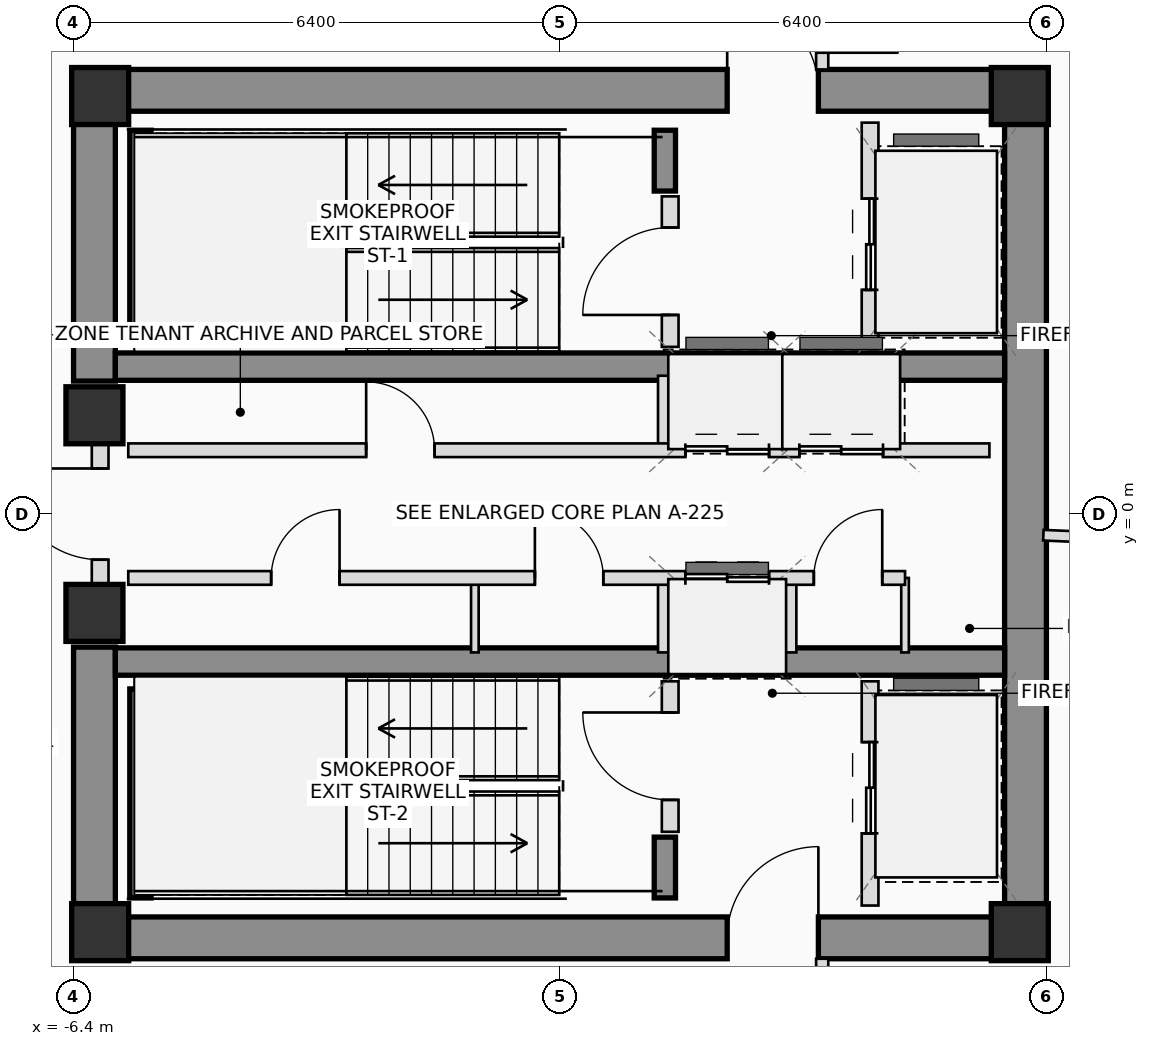
"""IFC4 building model, lengths in metres.
Left out: names, types, materials, properties, quantities, classifications, styles, units other than length and angle.
Written with IfcOpenShell. Run it as: python <this file> out.ifc"""

import sys

from ifc_helpers import new_model, si_unit, direction, frame, frame_2d, origin, origin_2d, place, context, subcontext, project, spatial, rectangle, extrude, source, transform, mapped, element, fill, save


model = new_model("IFC4")
c1 = context("Model", 3, precision=1e-05, world=origin(), true_north=direction((0.0, 1.0)))
c2 = subcontext(c1, "Body", "Model", "MODEL_VIEW")
j1 = project(units=[si_unit("LENGTHUNIT", "METRE"), si_unit("PLANEANGLEUNIT", "RADIAN")], contexts=[c1])
p1 = place(None, origin())
s1 = spatial("IfcSite", under=j1, at=p1, CompositionType="ELEMENT")
p2 = place(p1, origin())
s2 = spatial("IfcBuilding", under=s1, at=p2, CompositionType="ELEMENT")
p3 = place(p2, frame((0.0, 0.0, 267.75)))
s3 = spatial("IfcBuildingStorey", under=s2, at=p3, CompositionType="ELEMENT", Elevation=267.75)
m1 = source(origin(), c2, "Body", "SweptSolid", [
    extrude(rectangle(XDim=0.75, YDim=0.75, at=origin_2d()), origin(), (0.0, 0.0, 1.0), 3.4),
])
for number, where, z_axis, x_axis in (
    (1, (-6.05, -5.5, 0.0), (0.0, 0.0, 1.0), (1.0, 0.0, 0.0)),
    (2, (6.05, -5.5, 0.0), (0.0, 0.0, 1.0), (1.0, 0.0, 0.0)),
    (3, (6.05, 5.5, 0.0), (0.0, 0.0, 1.0), (1.0, 0.0, 0.0)),
    (4, (-6.05, 5.5, 0.0), (0.0, 0.0, 1.0), (1.0, 0.0, 0.0)),
):
    element("IfcColumn", number, at=place(p3, frame(where, z_axis=z_axis, x_axis=x_axis)), inside=s3, PredefinedType="COLUMN", context=c2, shape_type="MappedRepresentation", body=[
        mapped(m1, transform((0.0, 0.0, 0.0), scale=1.0)),
    ])
p4 = place(p3, frame((-6.4, 5.575, 0.0), z_axis=(0.0, 0.0, 1.0), x_axis=(1.0, 0.0, 0.0)))
e5 = element("IfcWall", 5, at=p4, inside=s3, PredefinedType="SHEAR", context=c2, shape_type="SweptSolid", body=[
    extrude(rectangle(XDim=12.8, YDim=0.55, at=frame_2d((6.4, 0.0))), origin(), (0.0, 0.0, 1.0), 3.4),
])
p5 = place(p4, frame((8.6, 0.0, 0.0)))
e6 = element("IfcOpeningElement", 6, at=p5, cuts=e5, PredefinedType="OPENING", context=c2, shape_type="SweptSolid", body=[
    extrude(rectangle(XDim=1.2, YDim=2.2, at=frame_2d((0.6, 1.1))), frame((0.0, 0.285, 0.0), z_axis=(0.0, -1.0, 0.0), x_axis=(1.0, 0.0, 0.0)), (0.0, 0.0, 1.0), 0.57),
])
p6 = place(p3, frame((-6.4, -5.575, 0.0), z_axis=(0.0, 0.0, 1.0), x_axis=(1.0, 0.0, 0.0)))
e7 = element("IfcWall", 7, at=p6, inside=s3, PredefinedType="SHEAR", context=c2, shape_type="SweptSolid", body=[
    extrude(rectangle(XDim=12.8, YDim=0.55, at=frame_2d((6.4, 0.0))), origin(), (0.0, 0.0, 1.0), 3.4),
])
p7 = place(p6, frame((8.6, 0.0, 0.0)))
e8 = element("IfcOpeningElement", 8, at=p7, cuts=e7, PredefinedType="OPENING", context=c2, shape_type="SweptSolid", body=[
    extrude(rectangle(XDim=1.2, YDim=2.2, at=frame_2d((0.6, 1.1))), frame((0.0, 0.285, 0.0), z_axis=(0.0, -1.0, 0.0), x_axis=(1.0, 0.0, 0.0)), (0.0, 0.0, 1.0), 0.57),
])
p8 = place(p3, frame((6.125, -5.3, 0.0), z_axis=(0.0, 0.0, 1.0), x_axis=(0.0, 1.0, 0.0)))
e9 = element("IfcWall", 9, at=p8, inside=s3, PredefinedType="SHEAR", context=c2, shape_type="SweptSolid", body=[
    extrude(rectangle(XDim=10.6, YDim=0.55, at=frame_2d((5.3, 0.0))), origin(), (0.0, 0.0, 1.0), 3.4),
])
for number, where, z_axis, x_axis in (
    (10, (-6.125, -5.3, 0.0), (0.0, 0.0, 1.0), (0.0, 1.0, 0.0)),
    (11, (-6.125, 1.75, 0.0), (0.0, 0.0, 1.0), (0.0, 1.0, 0.0)),
):
    element("IfcWall", number, at=place(p3, frame(where, z_axis=z_axis, x_axis=x_axis)), inside=s3, PredefinedType="SHEAR", context=c2, shape_type="SweptSolid", body=[
        extrude(rectangle(XDim=3.55, YDim=0.55, at=frame_2d((1.775, 0.0))), origin(), (0.0, 0.0, 1.0), 3.4),
    ])
for number, where, z_axis, x_axis in (
    (12, (-5.85, 1.94, 0.0), (0.0, 0.0, 1.0), (1.0, 0.0, 0.0)),
    (13, (-5.85, -1.94, 0.0), (0.0, 0.0, 1.0), (1.0, 0.0, 0.0)),
):
    element("IfcWall", number, at=place(p3, frame(where, z_axis=z_axis, x_axis=x_axis)), inside=s3, PredefinedType="SHEAR", context=c2, shape_type="SweptSolid", body=[
        extrude(rectangle(XDim=11.7, YDim=0.36, at=frame_2d((5.85, 0.0))), origin(), (0.0, 0.0, 1.0), 3.4),
    ])
p9 = place(p3, frame((-5.52, 2.3, 0.0), z_axis=(0.0, 0.0, 1.0), x_axis=(0.0, 1.0, 0.0)))
e14 = element("IfcWall", 14, at=p9, inside=s3, PredefinedType="SHEAR", context=c2, shape_type="SweptSolid", body=[
    extrude(rectangle(XDim=2.75, YDim=0.28, at=frame_2d((1.375, 0.0))), origin(), (0.0, 0.0, 1.0), 3.4),
])
p10 = place(p3, frame((1.38, 4.25, 0.0), z_axis=(0.0, 0.0, 1.0), x_axis=(0.0, 1.0, 0.0)))
e15 = element("IfcWall", 15, at=p10, inside=s3, PredefinedType="SHEAR", context=c2, shape_type="SweptSolid", body=[
    extrude(rectangle(XDim=0.8, YDim=0.28, at=frame_2d((0.4, 0.0))), origin(), (0.0, 0.0, 1.0), 3.4),
])
p11 = place(p3, frame((-5.52, -5.05, 0.0), z_axis=(0.0, 0.0, 1.0), x_axis=(0.0, 1.0, 0.0)))
e16 = element("IfcWall", 16, at=p11, inside=s3, PredefinedType="SHEAR", context=c2, shape_type="SweptSolid", body=[
    extrude(rectangle(XDim=2.75, YDim=0.28, at=frame_2d((1.375, 0.0))), origin(), (0.0, 0.0, 1.0), 3.4),
])
p12 = place(p3, frame((1.38, -5.05, 0.0), z_axis=(0.0, 0.0, 1.0), x_axis=(0.0, 1.0, 0.0)))
e17 = element("IfcWall", 17, at=p12, inside=s3, PredefinedType="SHEAR", context=c2, shape_type="SweptSolid", body=[
    extrude(rectangle(XDim=0.8, YDim=0.28, at=frame_2d((0.4, 0.0))), origin(), (0.0, 0.0, 1.0), 3.4),
])
for number, where, z_axis, x_axis in (
    (18, (-6.125, -1.3, 0.0), (0.0, 0.0, 1.0), (1.0, 0.0, 0.0)),
    (19, (-6.125, 1.3, 0.0), (0.0, 0.0, 1.0), (1.0, 0.0, 0.0)),
):
    element("IfcColumn", number, at=place(p3, frame(where, z_axis=z_axis, x_axis=x_axis)), inside=s3, PredefinedType="COLUMN", context=c2, shape_type="MappedRepresentation", body=[
        mapped(m1, transform((0.0, 0.0, 0.0), scale=1.0)),
    ])
p13 = place(p3, frame((-6.05, -0.95, 0.0), z_axis=(0.0, 0.0, 1.0), x_axis=(0.0, 1.0, 0.0)))
e20 = element("IfcWall", 20, at=p13, inside=s3, PredefinedType="PLUMBINGWALL", context=c2, shape_type="SweptSolid", body=[
    extrude(rectangle(XDim=1.9, YDim=0.22, at=frame_2d((0.95, 0.0))), origin(), (0.0, 0.0, 1.0), 2.18),
])
p14 = place(p13, frame((0.35, 0.0, 0.0)))
e21 = element("IfcOpeningElement", 21, at=p14, cuts=e20, PredefinedType="OPENING", context=c2, shape_type="SweptSolid", body=[
    extrude(rectangle(XDim=1.2, YDim=2.2, at=frame_2d((0.6, 1.1))), frame((0.0, 0.12, 0.0), z_axis=(0.0, -1.0, 0.0), x_axis=(1.0, 0.0, 0.0)), (0.0, 0.0, 1.0), 0.24),
])
p15 = place(p3, frame((1.45, 2.2, 0.0), z_axis=(0.0, 0.0, 1.0), x_axis=(0.0, 1.0, 0.0)))
e22 = element("IfcWall", 22, at=p15, inside=s3, PredefinedType="PLUMBINGWALL", context=c2, shape_type="SweptSolid", body=[
    extrude(rectangle(XDim=1.98, YDim=0.22, at=frame_2d((0.99, 0.0))), origin(), (0.0, 0.0, 1.0), 3.2),
])
p16 = place(p15, frame((0.42, 0.0, 0.0)))
e23 = element("IfcOpeningElement", 23, at=p16, cuts=e22, PredefinedType="OPENING", context=c2, shape_type="SweptSolid", body=[
    extrude(rectangle(XDim=1.15, YDim=2.15, at=frame_2d((0.575, 1.075))), frame((0.0, 0.12, 0.0), z_axis=(0.0, -1.0, 0.0), x_axis=(1.0, 0.0, 0.0)), (0.0, 0.0, 1.0), 0.24),
])
p17 = place(p3, frame((4.08, 2.2, 0.0), z_axis=(0.0, 0.0, 1.0), x_axis=(0.0, 1.0, 0.0)))
e24 = element("IfcWall", 24, at=p17, inside=s3, PredefinedType="PLUMBINGWALL", context=c2, shape_type="SweptSolid", body=[
    extrude(rectangle(XDim=2.95, YDim=0.22, at=frame_2d((1.475, 0.0))), origin(), (0.0, 0.0, 1.0), 3.2),
])
p18 = place(p17, frame((0.75, 0.0, 0.0)))
e25 = element("IfcOpeningElement", 25, at=p18, cuts=e24, PredefinedType="OPENING", context=c2, shape_type="SweptSolid", body=[
    extrude(rectangle(XDim=1.2, YDim=2.25, at=frame_2d((0.6, 1.125))), frame((0.0, 0.12, 0.0), z_axis=(0.0, -1.0, 0.0), x_axis=(1.0, 0.0, 0.0)), (0.0, 0.0, 1.0), 0.24),
])
p19 = place(p3, frame((1.45, -4.18, 0.0), z_axis=(0.0, 0.0, 1.0), x_axis=(0.0, 1.0, 0.0)))
e26 = element("IfcWall", 26, at=p19, inside=s3, PredefinedType="PLUMBINGWALL", context=c2, shape_type="SweptSolid", body=[
    extrude(rectangle(XDim=1.98, YDim=0.22, at=frame_2d((0.99, 0.0))), origin(), (0.0, 0.0, 1.0), 3.2),
])
p20 = place(p19, frame((0.42, 0.0, 0.0)))
e27 = element("IfcOpeningElement", 27, at=p20, cuts=e26, PredefinedType="OPENING", context=c2, shape_type="SweptSolid", body=[
    extrude(rectangle(XDim=1.15, YDim=2.15, at=frame_2d((0.575, 1.075))), frame((0.0, 0.12, 0.0), z_axis=(0.0, -1.0, 0.0), x_axis=(1.0, 0.0, 0.0)), (0.0, 0.0, 1.0), 0.24),
])
p21 = place(p3, frame((4.08, -5.15, 0.0), z_axis=(0.0, 0.0, 1.0), x_axis=(0.0, 1.0, 0.0)))
e28 = element("IfcWall", 28, at=p21, inside=s3, PredefinedType="PLUMBINGWALL", context=c2, shape_type="SweptSolid", body=[
    extrude(rectangle(XDim=2.95, YDim=0.22, at=frame_2d((1.475, 0.0))), origin(), (0.0, 0.0, 1.0), 3.2),
])
p22 = place(p21, frame((0.95, 0.0, 0.0)))
e29 = element("IfcOpeningElement", 29, at=p22, cuts=e28, PredefinedType="OPENING", context=c2, shape_type="SweptSolid", body=[
    extrude(rectangle(XDim=1.2, YDim=2.25, at=frame_2d((0.6, 1.125))), frame((0.0, 0.12, 0.0), z_axis=(0.0, -1.0, 0.0), x_axis=(1.0, 0.0, 0.0)), (0.0, 0.0, 1.0), 0.24),
])
p23 = place(p3, frame((-1.12, -1.82, 0.0), z_axis=(0.0, 0.0, 1.0), x_axis=(0.0, 1.0, 0.0)))
e30 = element("IfcWall", 30, at=p23, inside=s3, PredefinedType="PARTITIONING", context=c2, shape_type="SweptSolid", body=[
    extrude(rectangle(XDim=0.98, YDim=0.1, at=frame_2d((0.49, 0.0))), origin(), (0.0, 0.0, 1.0), 3.2),
])
for number, where, z_axis, x_axis in (
    (31, (1.38, 0.84, 0.0), (0.0, 0.0, 1.0), (0.0, 1.0, 0.0)),
    (32, (1.38, -1.82, 0.0), (0.0, 0.0, 1.0), (0.0, 1.0, 0.0)),
    (33, (3.02, 0.84, 0.0), (0.0, 0.0, 1.0), (0.0, 1.0, 0.0)),
    (34, (4.38, 0.84, 0.0), (0.0, 0.0, 1.0), (0.0, 1.0, 0.0)),
    (35, (3.02, -1.82, 0.0), (0.0, 0.0, 1.0), (0.0, 1.0, 0.0)),
):
    element("IfcWall", number, at=place(p3, frame(where, z_axis=z_axis, x_axis=x_axis)), inside=s3, PredefinedType="PLUMBINGWALL", context=c2, shape_type="SweptSolid", body=[
        extrude(rectangle(XDim=0.98, YDim=0.18, at=frame_2d((0.49, 0.0))), origin(), (0.0, 0.0, 1.0), 3.2),
    ])
p24 = place(p3, frame((4.54, -1.82, 0.0), z_axis=(0.0, 0.0, 1.0), x_axis=(0.0, 1.0, 0.0)))
e36 = element("IfcWall", 36, at=p24, inside=s3, PredefinedType="PARTITIONING", context=c2, shape_type="SweptSolid", body=[
    extrude(rectangle(XDim=0.98, YDim=0.1, at=frame_2d((0.49, 0.0))), origin(), (0.0, 0.0, 1.0), 3.2),
])
p25 = place(p3, frame((-5.68, 0.84, 0.0), z_axis=(0.0, 0.0, 1.0), x_axis=(1.0, 0.0, 0.0)))
e37 = element("IfcWall", 37, at=p25, inside=s3, PredefinedType="PLUMBINGWALL", context=c2, shape_type="SweptSolid", body=[
    extrude(rectangle(XDim=11.33, YDim=0.18, at=frame_2d((5.665, 0.0))), origin(), (0.0, 0.0, 1.0), 3.2),
])
p26 = place(p25, frame((3.13, 0.0, 0.0)))
e38 = element("IfcOpeningElement", 38, at=p26, cuts=e37, PredefinedType="OPENING", context=c2, shape_type="SweptSolid", body=[
    extrude(rectangle(XDim=0.9, YDim=2.05, at=frame_2d((0.45, 1.025))), frame((0.0, 0.1, 0.0), z_axis=(0.0, -1.0, 0.0), x_axis=(1.0, 0.0, 0.0)), (0.0, 0.0, 1.0), 0.2),
])
p27 = place(p25, frame((7.33, 0.0, 0.0)))
e39 = element("IfcOpeningElement", 39, at=p27, cuts=e37, PredefinedType="OPENING", context=c2, shape_type="SweptSolid", body=[
    extrude(rectangle(XDim=1.1, YDim=2.2, at=frame_2d((0.55, 1.1))), frame((0.0, 0.1, 0.0), z_axis=(0.0, -1.0, 0.0), x_axis=(1.0, 0.0, 0.0)), (0.0, 0.0, 1.0), 0.2),
])
p28 = place(p25, frame((8.83, 0.0, 0.0)))
e40 = element("IfcOpeningElement", 40, at=p28, cuts=e37, PredefinedType="OPENING", context=c2, shape_type="SweptSolid", body=[
    extrude(rectangle(XDim=1.1, YDim=2.2, at=frame_2d((0.55, 1.1))), frame((0.0, 0.1, 0.0), z_axis=(0.0, -1.0, 0.0), x_axis=(1.0, 0.0, 0.0)), (0.0, 0.0, 1.0), 0.2),
])
p29 = place(p3, frame((-5.68, -0.84, 0.0), z_axis=(0.0, 0.0, 1.0), x_axis=(1.0, 0.0, 0.0)))
e41 = element("IfcWall", 41, at=p29, inside=s3, PredefinedType="PLUMBINGWALL", context=c2, shape_type="SweptSolid", body=[
    extrude(rectangle(XDim=10.22, YDim=0.18, at=frame_2d((5.11, 0.0))), origin(), (0.0, 0.0, 1.0), 3.2),
])
p30 = place(p29, frame((1.88, 0.0, 0.0)))
e42 = element("IfcOpeningElement", 42, at=p30, cuts=e41, PredefinedType="OPENING", context=c2, shape_type="SweptSolid", body=[
    extrude(rectangle(XDim=0.9, YDim=2.05, at=frame_2d((0.45, 1.025))), frame((0.0, 0.1, 0.0), z_axis=(0.0, -1.0, 0.0), x_axis=(1.0, 0.0, 0.0)), (0.0, 0.0, 1.0), 0.2),
])
p31 = place(p29, frame((5.35, 0.0, 0.0)))
e43 = element("IfcOpeningElement", 43, at=p31, cuts=e41, PredefinedType="OPENING", context=c2, shape_type="SweptSolid", body=[
    extrude(rectangle(XDim=0.9, YDim=2.05, at=frame_2d((0.45, 1.025))), frame((0.0, 0.1, 0.0), z_axis=(0.0, -1.0, 0.0), x_axis=(1.0, 0.0, 0.0)), (0.0, 0.0, 1.0), 0.2),
])
p32 = place(p29, frame((7.33, 0.0, 0.0)))
e44 = element("IfcOpeningElement", 44, at=p32, cuts=e41, PredefinedType="OPENING", context=c2, shape_type="SweptSolid", body=[
    extrude(rectangle(XDim=1.1, YDim=2.2, at=frame_2d((0.55, 1.1))), frame((0.0, 0.1, 0.0), z_axis=(0.0, -1.0, 0.0), x_axis=(1.0, 0.0, 0.0)), (0.0, 0.0, 1.0), 0.2),
])
p33 = place(p29, frame((9.02, 0.0, 0.0)))
e45 = element("IfcOpeningElement", 45, at=p33, cuts=e41, PredefinedType="OPENING", context=c2, shape_type="SweptSolid", body=[
    extrude(rectangle(XDim=0.9, YDim=2.05, at=frame_2d((0.45, 1.025))), frame((0.0, 0.1, 0.0), z_axis=(0.0, -1.0, 0.0), x_axis=(1.0, 0.0, 0.0)), (0.0, 0.0, 1.0), 0.2),
])
p34 = place(p3, frame((3.45, 7.49, 0.0), z_axis=(0.0, 0.0, 1.0), x_axis=(0.0, -1.0, 0.0)))
e46 = element("IfcWall", 46, at=p34, inside=s3, PredefinedType="PARTITIONING", context=c2, shape_type="SweptSolid", body=[
    extrude(rectangle(XDim=1.64, YDim=0.16, at=frame_2d((0.82, 0.0))), origin(), (0.0, 0.0, 1.0), 2.805),
])
p35 = place(p34, frame((0.42, 0.0, 0.0)))
e47 = element("IfcOpeningElement", 47, at=p35, cuts=e46, PredefinedType="OPENING", context=c2, shape_type="SweptSolid", body=[
    extrude(rectangle(XDim=1.0, YDim=2.25, at=frame_2d((0.5, 1.125))), frame((0.0, 0.09, 0.0), z_axis=(0.0, -1.0, 0.0), x_axis=(1.0, 0.0, 0.0)), (0.0, 0.0, 1.0), 0.18),
])
p36 = place(p3, frame((3.45, -5.85, 0.0), z_axis=(0.0, 0.0, 1.0), x_axis=(0.0, -1.0, 0.0)))
e48 = element("IfcWall", 48, at=p36, inside=s3, PredefinedType="PARTITIONING", context=c2, shape_type="SweptSolid", body=[
    extrude(rectangle(XDim=1.64, YDim=0.16, at=frame_2d((0.82, 0.0))), origin(), (0.0, 0.0, 1.0), 3.2),
])
p37 = place(p36, frame((0.32, 0.0, 0.0)))
e49 = element("IfcOpeningElement", 49, at=p37, cuts=e48, PredefinedType="OPENING", context=c2, shape_type="SweptSolid", body=[
    extrude(rectangle(XDim=1.0, YDim=2.25, at=frame_2d((0.5, 1.125))), frame((0.0, 0.09, 0.0), z_axis=(0.0, -1.0, 0.0), x_axis=(1.0, 0.0, 0.0)), (0.0, 0.0, 1.0), 0.18),
])
p38 = place(p3, frame((6.36, -0.278, 0.0), z_axis=(0.0, 0.0, 1.0), x_axis=(0.999047788643, -0.043629302162, 0.0)))
e50 = element("IfcWall", 50, at=p38, inside=s3, PredefinedType="PARTITIONING", context=c2, shape_type="SweptSolid", body=[
    extrude(rectangle(XDim=11.197, YDim=0.14, at=frame_2d((5.599, 0.0))), origin(), (0.0, 0.0, 1.0), 2.765),
])
p39 = place(p5, origin())
e51 = element("IfcDoor", 51, at=p39, inside=s3, OperationType="SINGLE_SWING_LEFT", PredefinedType="DOOR", context=c2, shape_type="SweptSolid", body=[
    extrude(rectangle(XDim=1.2, YDim=2.2, at=frame_2d((0.6, 1.1))), frame((0.0, 0.025, 0.0), z_axis=(0.0, -1.0, 0.0), x_axis=(1.0, 0.0, 0.0)), (0.0, 0.0, 1.0), 0.05),
])
fill(e6, e51)
p40 = place(p7, origin())
e52 = element("IfcDoor", 52, at=p40, inside=s3, OperationType="SINGLE_SWING_RIGHT", PredefinedType="DOOR", context=c2, shape_type="SweptSolid", body=[
    extrude(rectangle(XDim=1.2, YDim=2.2, at=frame_2d((0.6, 1.1))), frame((0.0, 0.025, 0.0), z_axis=(0.0, -1.0, 0.0), x_axis=(1.0, 0.0, 0.0)), (0.0, 0.0, 1.0), 0.05),
])
fill(e8, e52)
p41 = place(p14, origin())
e53 = element("IfcDoor", 53, at=p41, inside=s3, OperationType="SINGLE_SWING_RIGHT", PredefinedType="DOOR", context=c2, shape_type="SweptSolid", body=[
    extrude(rectangle(XDim=1.2, YDim=2.2, at=frame_2d((0.6, 1.1))), frame((0.0, 0.025, 0.0), z_axis=(0.0, -1.0, 0.0), x_axis=(1.0, 0.0, 0.0)), (0.0, 0.0, 1.0), 0.05),
])
fill(e21, e53)
p42 = place(p16, origin())
e54 = element("IfcDoor", 54, at=p42, inside=s3, OperationType="SINGLE_SWING_LEFT", PredefinedType="DOOR", context=c2, shape_type="SweptSolid", body=[
    extrude(rectangle(XDim=1.15, YDim=2.15, at=frame_2d((0.575, 1.075))), frame((0.0, 0.025, 0.0), z_axis=(0.0, -1.0, 0.0), x_axis=(1.0, 0.0, 0.0)), (0.0, 0.0, 1.0), 0.05),
])
fill(e23, e54)
p43 = place(p18, origin())
e55 = element("IfcDoor", 55, at=p43, inside=s3, OperationType="DOUBLE_DOOR_SLIDING", PredefinedType="DOOR", context=c2, shape_type="SweptSolid", body=[
    extrude(rectangle(XDim=1.2, YDim=2.25, at=frame_2d((0.6, 1.125))), frame((0.0, 0.025, 0.0), z_axis=(0.0, -1.0, 0.0), x_axis=(1.0, 0.0, 0.0)), (0.0, 0.0, 1.0), 0.05),
])
fill(e25, e55)
p44 = place(p20, origin())
e56 = element("IfcDoor", 56, at=p44, inside=s3, OperationType="SINGLE_SWING_RIGHT", PredefinedType="DOOR", context=c2, shape_type="SweptSolid", body=[
    extrude(rectangle(XDim=1.15, YDim=2.15, at=frame_2d((0.575, 1.075))), frame((0.0, 0.025, 0.0), z_axis=(0.0, -1.0, 0.0), x_axis=(1.0, 0.0, 0.0)), (0.0, 0.0, 1.0), 0.05),
])
fill(e27, e56)
p45 = place(p22, origin())
e57 = element("IfcDoor", 57, at=p45, inside=s3, OperationType="DOUBLE_DOOR_SLIDING", PredefinedType="DOOR", context=c2, shape_type="SweptSolid", body=[
    extrude(rectangle(XDim=1.2, YDim=2.25, at=frame_2d((0.6, 1.125))), frame((0.0, 0.025, 0.0), z_axis=(0.0, -1.0, 0.0), x_axis=(1.0, 0.0, 0.0)), (0.0, 0.0, 1.0), 0.05),
])
fill(e29, e57)
p46 = place(p26, origin())
e58 = element("IfcDoor", 58, at=p46, inside=s3, OperationType="SINGLE_SWING_LEFT", PredefinedType="DOOR", context=c2, shape_type="SweptSolid", body=[
    extrude(rectangle(XDim=0.9, YDim=2.05, at=frame_2d((0.45, 1.025))), frame((0.0, 0.025, 0.0), z_axis=(0.0, -1.0, 0.0), x_axis=(1.0, 0.0, 0.0)), (0.0, 0.0, 1.0), 0.05),
])
fill(e38, e58)
p47 = place(p27, origin())
e59 = element("IfcDoor", 59, at=p47, inside=s3, OperationType="DOUBLE_DOOR_SLIDING", PredefinedType="DOOR", context=c2, shape_type="SweptSolid", body=[
    extrude(rectangle(XDim=1.1, YDim=2.2, at=frame_2d((0.55, 1.1))), frame((0.0, 0.025, 0.0), z_axis=(0.0, -1.0, 0.0), x_axis=(1.0, 0.0, 0.0)), (0.0, 0.0, 1.0), 0.05),
])
fill(e39, e59)
p48 = place(p28, origin())
e60 = element("IfcDoor", 60, at=p48, inside=s3, OperationType="DOUBLE_DOOR_SLIDING", PredefinedType="DOOR", context=c2, shape_type="SweptSolid", body=[
    extrude(rectangle(XDim=1.1, YDim=2.2, at=frame_2d((0.55, 1.1))), frame((0.0, 0.025, 0.0), z_axis=(0.0, -1.0, 0.0), x_axis=(1.0, 0.0, 0.0)), (0.0, 0.0, 1.0), 0.05),
])
fill(e40, e60)
p49 = place(p30, origin())
e61 = element("IfcDoor", 61, at=p49, inside=s3, OperationType="SINGLE_SWING_RIGHT", PredefinedType="DOOR", context=c2, shape_type="SweptSolid", body=[
    extrude(rectangle(XDim=0.9, YDim=2.05, at=frame_2d((0.45, 1.025))), frame((0.0, 0.025, 0.0), z_axis=(0.0, -1.0, 0.0), x_axis=(1.0, 0.0, 0.0)), (0.0, 0.0, 1.0), 0.05),
])
fill(e42, e61)
p50 = place(p31, origin())
e62 = element("IfcDoor", 62, at=p50, inside=s3, OperationType="SINGLE_SWING_LEFT", PredefinedType="DOOR", context=c2, shape_type="SweptSolid", body=[
    extrude(rectangle(XDim=0.9, YDim=2.05, at=frame_2d((0.45, 1.025))), frame((0.0, 0.025, 0.0), z_axis=(0.0, -1.0, 0.0), x_axis=(1.0, 0.0, 0.0)), (0.0, 0.0, 1.0), 0.05),
])
fill(e43, e62)
p51 = place(p32, origin())
e63 = element("IfcDoor", 63, at=p51, inside=s3, OperationType="DOUBLE_DOOR_SLIDING", PredefinedType="DOOR", context=c2, shape_type="SweptSolid", body=[
    extrude(rectangle(XDim=1.1, YDim=2.2, at=frame_2d((0.55, 1.1))), frame((0.0, 0.025, 0.0), z_axis=(0.0, -1.0, 0.0), x_axis=(1.0, 0.0, 0.0)), (0.0, 0.0, 1.0), 0.05),
])
fill(e44, e63)
p52 = place(p33, origin())
e64 = element("IfcDoor", 64, at=p52, inside=s3, OperationType="SINGLE_SWING_RIGHT", PredefinedType="DOOR", context=c2, shape_type="SweptSolid", body=[
    extrude(rectangle(XDim=0.9, YDim=2.05, at=frame_2d((0.45, 1.025))), frame((0.0, 0.025, 0.0), z_axis=(0.0, -1.0, 0.0), x_axis=(1.0, 0.0, 0.0)), (0.0, 0.0, 1.0), 0.05),
])
fill(e45, e64)
p53 = place(p35, origin())
e65 = element("IfcDoor", 65, at=p53, inside=s3, OperationType="SINGLE_SWING_RIGHT", PredefinedType="DOOR", context=c2, shape_type="SweptSolid", body=[
    extrude(rectangle(XDim=1.0, YDim=2.25, at=frame_2d((0.5, 1.125))), frame((0.0, 0.025, 0.0), z_axis=(0.0, -1.0, 0.0), x_axis=(1.0, 0.0, 0.0)), (0.0, 0.0, 1.0), 0.05),
])
fill(e47, e65)
save(model, sys.argv[1])
